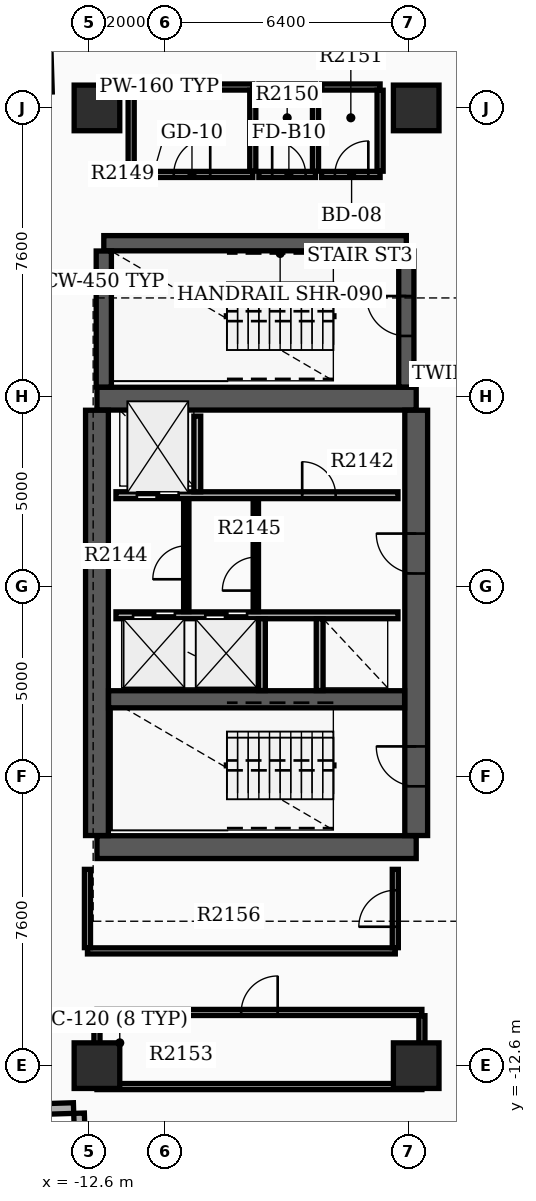
"""IFC4 building model, lengths in metres.
Left out: names, types, materials, properties, quantities, classifications, styles, units other than length and angle.
Written with IfcOpenShell. Run it as: python <this file> out.ifc"""

import sys

from ifc_helpers import new_model, si_unit, direction, frame, frame_2d, origin, origin_2d, place, context, subcontext, project, spatial, rectangle, extrude, element, fill, save


model = new_model("IFC4")
c1 = context("Model", 3, precision=1e-05, world=origin(), true_north=direction((0.0, 1.0)))
c2 = subcontext(c1, "Body", "Model", "MODEL_VIEW")
j1 = project(units=[si_unit("LENGTHUNIT", "METRE"), si_unit("PLANEANGLEUNIT", "RADIAN")], contexts=[c1])
p1 = place(None, origin())
s1 = spatial("IfcSite", under=j1, at=p1, CompositionType="ELEMENT")
p2 = place(p1, origin())
s2 = spatial("IfcBuilding", under=s1, at=p2, CompositionType="ELEMENT")
p3 = place(p2, frame((0.0, 0.0, 135.9)))
s3 = spatial("IfcBuildingStorey", under=s2, at=p3, CompositionType="ELEMENT", Elevation=135.9)
for number, where, z_axis, x_axis in (
    (1, (-12.4, -6.85, 0.0), (0.0, 0.0, 1.0), (1.0, 0.0, 0.0)),
    (2, (-12.4, 4.95, 0.0), (0.0, 0.0, 1.0), (1.0, 0.0, 0.0)),
):
    element("IfcWall", number, at=place(p3, frame(where, z_axis=z_axis, x_axis=x_axis)), inside=s3, PredefinedType="SHEAR", context=c2, shape_type="SweptSolid", body=[
        extrude(rectangle(XDim=8.4, YDim=0.6, at=frame_2d((4.2, 0.0))), origin(), (0.0, 0.0, 1.0), 3.7),
    ])
p4 = place(p3, frame((-12.4, -6.545, 0.0), z_axis=(0.0, 0.0, 1.0), x_axis=(0.0, 1.0, 0.0)))
e3 = element("IfcWall", 3, at=p4, inside=s3, PredefinedType="SHEAR", context=c2, shape_type="SweptSolid", body=[
    extrude(rectangle(XDim=11.19, YDim=0.6, at=frame_2d((5.595, 0.0))), origin(), (0.0, 0.0, 1.0), 3.7),
])
p5 = place(p3, frame((-4.0, -6.545, 0.0), z_axis=(0.0, 0.0, 1.0), x_axis=(0.0, 1.0, 0.0)))
e4 = element("IfcWall", 4, at=p5, inside=s3, PredefinedType="SHEAR", context=c2, shape_type="SweptSolid", body=[
    extrude(rectangle(XDim=11.19, YDim=0.6, at=frame_2d((5.595, 0.0))), origin(), (0.0, 0.0, 1.0), 3.7),
])
p6 = place(p5, frame((1.295, 0.0, 0.0)))
e5 = element("IfcOpeningElement", 5, at=p6, cuts=e4, PredefinedType="OPENING", context=c2, shape_type="SweptSolid", body=[
    extrude(rectangle(XDim=1.05, YDim=2.15, at=frame_2d((0.525, 1.075))), frame((0.0, 0.31, 0.0), z_axis=(0.0, -1.0, 0.0), x_axis=(1.0, 0.0, 0.0)), (0.0, 0.0, 1.0), 0.62),
])
p7 = place(p5, frame((6.895, 0.0, 0.0)))
e6 = element("IfcOpeningElement", 6, at=p7, cuts=e4, PredefinedType="OPENING", context=c2, shape_type="SweptSolid", body=[
    extrude(rectangle(XDim=1.05, YDim=2.15, at=frame_2d((0.525, 1.075))), frame((0.0, 0.31, 0.0), z_axis=(0.0, -1.0, 0.0), x_axis=(1.0, 0.0, 0.0)), (0.0, 0.0, 1.0), 0.62),
])
p8 = place(p3, frame((-12.095, -2.96, 0.0), z_axis=(0.0, 0.0, 1.0), x_axis=(1.0, 0.0, 0.0)))
e7 = element("IfcWall", 7, at=p8, inside=s3, PredefinedType="SHEAR", context=c2, shape_type="SweptSolid", body=[
    extrude(rectangle(XDim=7.79, YDim=0.45, at=frame_2d((3.895, 0.0))), origin(), (0.0, 0.0, 1.0), 3.7),
])
p9 = place(p3, frame((-12.22, 9.04, 0.0), z_axis=(0.0, 0.0, 1.0), x_axis=(1.0, 0.0, 0.0)))
e8 = element("IfcWall", 8, at=p9, inside=s3, PredefinedType="SHEAR", context=c2, shape_type="SweptSolid", body=[
    extrude(rectangle(XDim=7.96, YDim=0.4, at=frame_2d((3.98, 0.0))), origin(), (0.0, 0.0, 1.0), 3.7),
])
p10 = place(p3, frame((-12.22, 5.255, 0.0), z_axis=(0.0, 0.0, 1.0), x_axis=(0.0, 1.0, 0.0)))
e9 = element("IfcWall", 9, at=p10, inside=s3, PredefinedType="SHEAR", context=c2, shape_type="SweptSolid", body=[
    extrude(rectangle(XDim=3.58, YDim=0.4, at=frame_2d((1.79, 0.0))), origin(), (0.0, 0.0, 1.0), 3.7),
])
p11 = place(p3, frame((-4.26, 5.255, 0.0), z_axis=(0.0, 0.0, 1.0), x_axis=(0.0, 1.0, 0.0)))
e10 = element("IfcWall", 10, at=p11, inside=s3, PredefinedType="SHEAR", context=c2, shape_type="SweptSolid", body=[
    extrude(rectangle(XDim=3.58, YDim=0.4, at=frame_2d((1.79, 0.0))), origin(), (0.0, 0.0, 1.0), 3.7),
])
p12 = place(p11, frame((1.345, 0.0, 0.0)))
e11 = element("IfcOpeningElement", 11, at=p12, cuts=e10, PredefinedType="OPENING", context=c2, shape_type="SweptSolid", body=[
    extrude(rectangle(XDim=1.05, YDim=2.15, at=frame_2d((0.525, 1.075))), frame((0.0, 0.21, 0.0), z_axis=(0.0, -1.0, 0.0), x_axis=(1.0, 0.0, 0.0)), (0.0, 0.0, 1.0), 0.42),
])
for number, where, z_axis, x_axis in (
    (12, (-12.4, -12.6, 0.0), (0.0, 0.0, 1.0), (1.0, 0.0, 0.0)),
    (13, (-12.4, 12.6, 0.0), (0.0, 0.0, 1.0), (1.0, 0.0, 0.0)),
    (14, (-4.0, -12.6, 0.0), (0.0, 0.0, 1.0), (1.0, 0.0, 0.0)),
    (15, (-4.0, 12.6, 0.0), (0.0, 0.0, 1.0), (1.0, 0.0, 0.0)),
):
    element("IfcColumn", number, at=place(p3, frame(where, z_axis=z_axis, x_axis=x_axis)), inside=s3, PredefinedType="COLUMN", context=c2, shape_type="SweptSolid", body=[
        extrude(rectangle(XDim=1.2, YDim=1.2, at=origin_2d()), origin(), (0.0, 0.0, 1.0), 3.9),
    ])
p13 = place(p3, frame((-14.235, -13.754, 0.0), z_axis=(0.0, 0.0, 1.0), x_axis=(0.999506398264, 0.031415916822, 0.0)))
e16 = element("IfcWall", 16, at=p13, inside=s3, PredefinedType="STANDARD", context=c2, shape_type="SweptSolid", body=[
    extrude(rectangle(XDim=1.22, YDim=0.28, at=frame_2d((0.61, 0.0))), origin(), (0.0, 0.0, 1.0), 2.97),
])
p14 = place(p3, frame((-12.871, -13.851, 0.0), z_axis=(0.0, 0.0, 1.0), x_axis=(0.031412596484, -0.999506502621, 0.0)))
e17 = element("IfcWall", 17, at=p14, inside=s3, PredefinedType="STANDARD", context=c2, shape_type="SweptSolid", body=[
    extrude(rectangle(XDim=1.5, YDim=0.28, at=frame_2d((0.75, 0.0))), origin(), (0.0, 0.0, 1.0), 2.97),
])
p15 = place(p3, frame((-11.9, 2.41, 0.0), z_axis=(0.0, 0.0, 1.0), x_axis=(1.0, 0.0, 0.0)))
e18 = element("IfcWall", 18, at=p15, inside=s3, PredefinedType="SOLIDWALL", context=c2, shape_type="SweptSolid", body=[
    extrude(rectangle(XDim=7.42, YDim=0.18, at=frame_2d((3.71, 0.0))), origin(), (0.0, 0.0, 1.0), 2.96),
])
p16 = place(p15, frame((0.55, 0.0, 0.0)))
e19 = element("IfcOpeningElement", 19, at=p16, cuts=e18, PredefinedType="OPENING", context=c2, shape_type="SweptSolid", body=[
    extrude(rectangle(XDim=1.1, YDim=2.15, at=frame_2d((0.55, 1.075))), frame((0.0, 0.1, 0.0), z_axis=(0.0, -1.0, 0.0), x_axis=(1.0, 0.0, 0.0)), (0.0, 0.0, 1.0), 0.2),
])
p17 = place(p15, frame((4.9, 0.0, 0.0)))
e20 = element("IfcOpeningElement", 20, at=p17, cuts=e18, PredefinedType="OPENING", context=c2, shape_type="SweptSolid", body=[
    extrude(rectangle(XDim=0.88, YDim=2.1, at=frame_2d((0.44, 1.05))), frame((0.0, 0.1, 0.0), z_axis=(0.0, -1.0, 0.0), x_axis=(1.0, 0.0, 0.0)), (0.0, 0.0, 1.0), 0.2),
])
p18 = place(p3, frame((-11.9, -0.75, 0.0), z_axis=(0.0, 0.0, 1.0), x_axis=(1.0, 0.0, 0.0)))
e21 = element("IfcWall", 21, at=p18, inside=s3, PredefinedType="SOLIDWALL", context=c2, shape_type="SweptSolid", body=[
    extrude(rectangle(XDim=7.42, YDim=0.18, at=frame_2d((3.71, 0.0))), origin(), (0.0, 0.0, 1.0), 2.96),
])
p19 = place(p18, frame((0.45, 0.0, 0.0)))
e22 = element("IfcOpeningElement", 22, at=p19, cuts=e21, PredefinedType="OPENING", context=c2, shape_type="SweptSolid", body=[
    extrude(rectangle(XDim=1.1, YDim=2.15, at=frame_2d((0.55, 1.075))), frame((0.0, 0.1, 0.0), z_axis=(0.0, -1.0, 0.0), x_axis=(1.0, 0.0, 0.0)), (0.0, 0.0, 1.0), 0.2),
])
p20 = place(p18, frame((2.35, 0.0, 0.0)))
e23 = element("IfcOpeningElement", 23, at=p20, cuts=e21, PredefinedType="OPENING", context=c2, shape_type="SweptSolid", body=[
    extrude(rectangle(XDim=1.1, YDim=2.15, at=frame_2d((0.55, 1.075))), frame((0.0, 0.1, 0.0), z_axis=(0.0, -1.0, 0.0), x_axis=(1.0, 0.0, 0.0)), (0.0, 0.0, 1.0), 0.2),
])
p21 = place(p3, frame((-9.76, 2.5, 0.0), z_axis=(0.0, 0.0, 1.0), x_axis=(0.0, 1.0, 0.0)))
e24 = element("IfcWall", 24, at=p21, inside=s3, PredefinedType="SOLIDWALL", context=c2, shape_type="SweptSolid", body=[
    extrude(rectangle(XDim=1.99, YDim=0.18, at=frame_2d((0.995, 0.0))), origin(), (0.0, 0.0, 1.0), 2.96),
])
for number, where, z_axis, x_axis in (
    (25, (-8.06, -2.73, 0.0), (0.0, 0.0, 1.0), (0.0, 1.0, 0.0)),
    (26, (-6.54, -2.73, 0.0), (0.0, 0.0, 1.0), (0.0, 1.0, 0.0)),
):
    element("IfcWall", number, at=place(p3, frame(where, z_axis=z_axis, x_axis=x_axis)), inside=s3, PredefinedType="SOLIDWALL", context=c2, shape_type="SweptSolid", body=[
        extrude(rectangle(XDim=1.89, YDim=0.18, at=frame_2d((0.945, 0.0))), origin(), (0.0, 0.0, 1.0), 2.96),
    ])
p22 = place(p3, frame((-8.22, -0.65, 0.0), z_axis=(0.0, 0.0, 1.0), x_axis=(0.0, 1.0, 0.0)))
e27 = element("IfcWall", 27, at=p22, inside=s3, PredefinedType="SOLIDWALL", context=c2, shape_type="SweptSolid", body=[
    extrude(rectangle(XDim=2.96, YDim=0.14, at=frame_2d((1.48, 0.0))), origin(), (0.0, 0.0, 1.0), 2.96),
])
p23 = place(p22, frame((0.55, 0.0, 0.0)))
e28 = element("IfcOpeningElement", 28, at=p23, cuts=e27, PredefinedType="OPENING", context=c2, shape_type="SweptSolid", body=[
    extrude(rectangle(XDim=0.88, YDim=2.1, at=frame_2d((0.44, 1.05))), frame((0.0, 0.08, 0.0), z_axis=(0.0, -1.0, 0.0), x_axis=(1.0, 0.0, 0.0)), (0.0, 0.0, 1.0), 0.16),
])
p24 = place(p3, frame((-10.05, -0.652, 0.0), z_axis=(0.0, 0.0, 1.0), x_axis=(0.0, 1.0, 0.0)))
e29 = element("IfcWall", 29, at=p24, inside=s3, PredefinedType="PARTITIONING", context=c2, shape_type="SweptSolid", body=[
    extrude(rectangle(XDim=2.962, YDim=0.14, at=frame_2d((1.481, 0.0))), origin(), (0.0, 0.0, 1.0), 2.96),
])
p25 = place(p24, frame((0.85, 0.0, 0.0)))
e30 = element("IfcOpeningElement", 30, at=p25, cuts=e29, PredefinedType="OPENING", context=c2, shape_type="SweptSolid", body=[
    extrude(rectangle(XDim=0.88, YDim=2.1, at=frame_2d((0.44, 1.05))), frame((0.0, 0.08, 0.0), z_axis=(0.0, -1.0, 0.0), x_axis=(1.0, 0.0, 0.0)), (0.0, 0.0, 1.0), 0.16),
])
p26 = place(p3, frame((-11.5, 10.85, 0.0), z_axis=(0.0, 0.0, 1.0), x_axis=(1.0, 0.0, 0.0)))
e31 = element("IfcWall", 31, at=p26, inside=s3, PredefinedType="PARTITIONING", context=c2, shape_type="SweptSolid", body=[
    extrude(rectangle(XDim=3.2, YDim=0.16, at=frame_2d((1.6, 0.0))), origin(), (0.0, 0.0, 1.0), 2.96),
])
p27 = place(p26, frame((1.12, 0.0, 0.0)))
e32 = element("IfcOpeningElement", 32, at=p27, cuts=e31, PredefinedType="OPENING", context=c2, shape_type="SweptSolid", body=[
    extrude(rectangle(XDim=0.96, YDim=2.15, at=frame_2d((0.48, 1.075))), frame((0.0, 0.09, 0.0), z_axis=(0.0, -1.0, 0.0), x_axis=(1.0, 0.0, 0.0)), (0.0, 0.0, 1.0), 0.18),
])
p28 = place(p3, frame((-11.5, 13.15, 0.0), z_axis=(0.0, 0.0, 1.0), x_axis=(1.0, 0.0, 0.0)))
e33 = element("IfcWall", 33, at=p28, inside=s3, PredefinedType="PARTITIONING", context=c2, shape_type="SweptSolid", body=[
    extrude(rectangle(XDim=3.2, YDim=0.16, at=frame_2d((1.6, 0.0))), origin(), (0.0, 0.0, 1.0), 2.96),
])
for number, where, z_axis, x_axis in (
    (34, (-11.5, 10.935, 0.0), (0.0, 0.0, 1.0), (0.0, 1.0, 0.0)),
    (35, (-8.3, 10.935, 0.0), (0.0, 0.0, 1.0), (0.0, 1.0, 0.0)),
):
    element("IfcWall", number, at=place(p3, frame(where, z_axis=z_axis, x_axis=x_axis)), inside=s3, PredefinedType="PARTITIONING", context=c2, shape_type="SweptSolid", body=[
        extrude(rectangle(XDim=2.13, YDim=0.16, at=frame_2d((1.065, 0.0))), origin(), (0.0, 0.0, 1.0), 2.96),
    ])
p29 = place(p3, frame((-8.14, 10.85, 0.0), z_axis=(0.0, 0.0, 1.0), x_axis=(1.0, 0.0, 0.0)))
e36 = element("IfcWall", 36, at=p29, inside=s3, PredefinedType="PARTITIONING", context=c2, shape_type="SweptSolid", body=[
    extrude(rectangle(XDim=1.49, YDim=0.16, at=frame_2d((0.745, 0.0))), origin(), (0.0, 0.0, 1.0), 2.96),
])
p30 = place(p29, frame((0.35, 0.0, 0.0)))
e37 = element("IfcOpeningElement", 37, at=p30, cuts=e36, PredefinedType="OPENING", context=c2, shape_type="SweptSolid", body=[
    extrude(rectangle(XDim=0.88, YDim=2.1, at=frame_2d((0.44, 1.05))), frame((0.0, 0.09, 0.0), z_axis=(0.0, -1.0, 0.0), x_axis=(1.0, 0.0, 0.0)), (0.0, 0.0, 1.0), 0.18),
])
p31 = place(p3, frame((-8.14, 13.15, 0.0), z_axis=(0.0, 0.0, 1.0), x_axis=(1.0, 0.0, 0.0)))
e38 = element("IfcWall", 38, at=p31, inside=s3, PredefinedType="PARTITIONING", context=c2, shape_type="SweptSolid", body=[
    extrude(rectangle(XDim=1.49, YDim=0.16, at=frame_2d((0.745, 0.0))), origin(), (0.0, 0.0, 1.0), 2.96),
])
p32 = place(p3, frame((-6.65, 10.935, 0.0), z_axis=(0.0, 0.0, 1.0), x_axis=(0.0, 1.0, 0.0)))
e39 = element("IfcWall", 39, at=p32, inside=s3, PredefinedType="PARTITIONING", context=c2, shape_type="SweptSolid", body=[
    extrude(rectangle(XDim=2.13, YDim=0.16, at=frame_2d((1.065, 0.0))), origin(), (0.0, 0.0, 1.0), 2.96),
])
p33 = place(p3, frame((-6.49, 10.85, 0.0), z_axis=(0.0, 0.0, 1.0), x_axis=(1.0, 0.0, 0.0)))
e40 = element("IfcWall", 40, at=p33, inside=s3, PredefinedType="PARTITIONING", context=c2, shape_type="SweptSolid", body=[
    extrude(rectangle(XDim=1.54, YDim=0.16, at=frame_2d((0.77, 0.0))), origin(), (0.0, 0.0, 1.0), 2.96),
])
p34 = place(p33, frame((0.35, 0.0, 0.0)))
e41 = element("IfcOpeningElement", 41, at=p34, cuts=e40, PredefinedType="OPENING", context=c2, shape_type="SweptSolid", body=[
    extrude(rectangle(XDim=0.88, YDim=2.15, at=frame_2d((0.44, 1.075))), frame((0.0, 0.09, 0.0), z_axis=(0.0, -1.0, 0.0), x_axis=(1.0, 0.0, 0.0)), (0.0, 0.0, 1.0), 0.18),
])
p35 = place(p3, frame((-6.49, 13.15, 0.0), z_axis=(0.0, 0.0, 1.0), x_axis=(1.0, 0.0, 0.0)))
e42 = element("IfcWall", 42, at=p35, inside=s3, PredefinedType="PARTITIONING", context=c2, shape_type="SweptSolid", body=[
    extrude(rectangle(XDim=1.54, YDim=0.16, at=frame_2d((0.77, 0.0))), origin(), (0.0, 0.0, 1.0), 2.96),
])
p36 = place(p3, frame((-4.95, 10.935, 0.0), z_axis=(0.0, 0.0, 1.0), x_axis=(0.0, 1.0, 0.0)))
e43 = element("IfcWall", 43, at=p36, inside=s3, PredefinedType="PARTITIONING", context=c2, shape_type="SweptSolid", body=[
    extrude(rectangle(XDim=2.13, YDim=0.16, at=frame_2d((1.065, 0.0))), origin(), (0.0, 0.0, 1.0), 2.96),
])
p37 = place(p3, frame((-12.4, -13.15, 0.0), z_axis=(0.0, 0.0, 1.0), x_axis=(1.0, 0.0, 0.0)))
e44 = element("IfcWall", 44, at=p37, inside=s3, PredefinedType="PARTITIONING", context=c2, shape_type="SweptSolid", body=[
    extrude(rectangle(XDim=8.55, YDim=0.16, at=frame_2d((4.275, 0.0))), origin(), (0.0, 0.0, 1.0), 2.96),
])
p38 = place(p3, frame((-12.4, -11.2, 0.0), z_axis=(0.0, 0.0, 1.0), x_axis=(1.0, 0.0, 0.0)))
e45 = element("IfcWall", 45, at=p38, inside=s3, PredefinedType="PARTITIONING", context=c2, shape_type="SweptSolid", body=[
    extrude(rectangle(XDim=8.55, YDim=0.16, at=frame_2d((4.275, 0.0))), origin(), (0.0, 0.0, 1.0), 2.96),
])
p39 = place(p38, frame((3.795, 0.0, 0.0)))
e46 = element("IfcOpeningElement", 46, at=p39, cuts=e45, PredefinedType="OPENING", context=c2, shape_type="SweptSolid", body=[
    extrude(rectangle(XDim=0.96, YDim=2.15, at=frame_2d((0.48, 1.075))), frame((0.0, 0.09, 0.0), z_axis=(0.0, -1.0, 0.0), x_axis=(1.0, 0.0, 0.0)), (0.0, 0.0, 1.0), 0.18),
])
for number, where, z_axis, x_axis in (
    (47, (-12.4, -13.065, 0.0), (0.0, 0.0, 1.0), (0.0, 1.0, 0.0)),
    (48, (-3.85, -13.065, 0.0), (0.0, 0.0, 1.0), (0.0, 1.0, 0.0)),
):
    element("IfcWall", number, at=place(p3, frame(where, z_axis=z_axis, x_axis=x_axis)), inside=s3, PredefinedType="PARTITIONING", context=c2, shape_type="SweptSolid", body=[
        extrude(rectangle(XDim=1.78, YDim=0.16, at=frame_2d((0.89, 0.0))), origin(), (0.0, 0.0, 1.0), 2.96),
    ])
p40 = place(p3, frame((-12.65, -9.58, 0.0), z_axis=(0.0, 0.0, 1.0), x_axis=(1.0, 0.0, 0.0)))
e49 = element("IfcWall", 49, at=p40, inside=s3, PredefinedType="PARTITIONING", context=c2, shape_type="SweptSolid", body=[
    extrude(rectangle(XDim=8.1, YDim=0.16, at=frame_2d((4.05, 0.0))), origin(), (0.0, 0.0, 1.0), 2.96),
])
p41 = place(p3, frame((-12.65, -9.495, 0.0), z_axis=(0.0, 0.0, 1.0), x_axis=(0.0, 1.0, 0.0)))
e50 = element("IfcWall", 50, at=p41, inside=s3, PredefinedType="PARTITIONING", context=c2, shape_type="SweptSolid", body=[
    extrude(rectangle(XDim=2.06, YDim=0.16, at=frame_2d((1.03, 0.0))), origin(), (0.0, 0.0, 1.0), 2.96),
])
p42 = place(p3, frame((-4.55, -9.495, 0.0), z_axis=(0.0, 0.0, 1.0), x_axis=(0.0, 1.0, 0.0)))
e51 = element("IfcWall", 51, at=p42, inside=s3, PredefinedType="PARTITIONING", context=c2, shape_type="SweptSolid", body=[
    extrude(rectangle(XDim=2.06, YDim=0.16, at=frame_2d((1.03, 0.0))), origin(), (0.0, 0.0, 1.0), 2.96),
])
p43 = place(p42, frame((0.55, 0.0, 0.0)))
e52 = element("IfcOpeningElement", 52, at=p43, cuts=e51, PredefinedType="OPENING", context=c2, shape_type="SweptSolid", body=[
    extrude(rectangle(XDim=0.96, YDim=2.15, at=frame_2d((0.48, 1.075))), frame((0.0, 0.09, 0.0), z_axis=(0.0, -1.0, 0.0), x_axis=(1.0, 0.0, 0.0)), (0.0, 0.0, 1.0), 0.18),
])
p44 = place(p6, origin())
e53 = element("IfcDoor", 53, at=p44, inside=s3, OperationType="SINGLE_SWING_RIGHT", PredefinedType="DOOR", context=c2, shape_type="SweptSolid", body=[
    extrude(rectangle(XDim=1.05, YDim=2.15, at=frame_2d((0.525, 1.075))), frame((0.0, 0.025, 0.0), z_axis=(0.0, -1.0, 0.0), x_axis=(1.0, 0.0, 0.0)), (0.0, 0.0, 1.0), 0.05),
])
fill(e5, e53)
p45 = place(p7, origin())
e54 = element("IfcDoor", 54, at=p45, inside=s3, OperationType="SINGLE_SWING_RIGHT", PredefinedType="DOOR", context=c2, shape_type="SweptSolid", body=[
    extrude(rectangle(XDim=1.05, YDim=2.15, at=frame_2d((0.525, 1.075))), frame((0.0, 0.025, 0.0), z_axis=(0.0, -1.0, 0.0), x_axis=(1.0, 0.0, 0.0)), (0.0, 0.0, 1.0), 0.05),
])
fill(e6, e54)
p46 = place(p12, origin())
e55 = element("IfcDoor", 55, at=p46, inside=s3, OperationType="SINGLE_SWING_RIGHT", PredefinedType="DOOR", context=c2, shape_type="SweptSolid", body=[
    extrude(rectangle(XDim=1.05, YDim=2.15, at=frame_2d((0.525, 1.075))), frame((0.0, 0.025, 0.0), z_axis=(0.0, -1.0, 0.0), x_axis=(1.0, 0.0, 0.0)), (0.0, 0.0, 1.0), 0.05),
])
fill(e11, e55)
p47 = place(p16, origin())
e56 = element("IfcDoor", 56, at=p47, inside=s3, OperationType="DOUBLE_DOOR_SLIDING", PredefinedType="DOOR", context=c2, shape_type="SweptSolid", body=[
    extrude(rectangle(XDim=1.1, YDim=2.15, at=frame_2d((0.55, 1.075))), frame((0.0, 0.025, 0.0), z_axis=(0.0, -1.0, 0.0), x_axis=(1.0, 0.0, 0.0)), (0.0, 0.0, 1.0), 0.05),
])
fill(e19, e56)
p48 = place(p19, origin())
e57 = element("IfcDoor", 57, at=p48, inside=s3, OperationType="DOUBLE_DOOR_SLIDING", PredefinedType="DOOR", context=c2, shape_type="SweptSolid", body=[
    extrude(rectangle(XDim=1.1, YDim=2.15, at=frame_2d((0.55, 1.075))), frame((0.0, 0.025, 0.0), z_axis=(0.0, -1.0, 0.0), x_axis=(1.0, 0.0, 0.0)), (0.0, 0.0, 1.0), 0.05),
])
fill(e22, e57)
p49 = place(p20, origin())
e58 = element("IfcDoor", 58, at=p49, inside=s3, OperationType="DOUBLE_DOOR_SLIDING", PredefinedType="DOOR", context=c2, shape_type="SweptSolid", body=[
    extrude(rectangle(XDim=1.1, YDim=2.15, at=frame_2d((0.55, 1.075))), frame((0.0, 0.025, 0.0), z_axis=(0.0, -1.0, 0.0), x_axis=(1.0, 0.0, 0.0)), (0.0, 0.0, 1.0), 0.05),
])
fill(e23, e58)
p50 = place(p17, origin())
e59 = element("IfcDoor", 59, at=p50, inside=s3, OperationType="SINGLE_SWING_LEFT", PredefinedType="DOOR", context=c2, shape_type="SweptSolid", body=[
    extrude(rectangle(XDim=0.88, YDim=2.1, at=frame_2d((0.44, 1.05))), frame((0.0, 0.025, 0.0), z_axis=(0.0, -1.0, 0.0), x_axis=(1.0, 0.0, 0.0)), (0.0, 0.0, 1.0), 0.05),
])
fill(e20, e59)
p51 = place(p23, origin())
e60 = element("IfcDoor", 60, at=p51, inside=s3, OperationType="SINGLE_SWING_LEFT", PredefinedType="DOOR", context=c2, shape_type="SweptSolid", body=[
    extrude(rectangle(XDim=0.88, YDim=2.1, at=frame_2d((0.44, 1.05))), frame((0.0, 0.025, 0.0), z_axis=(0.0, -1.0, 0.0), x_axis=(1.0, 0.0, 0.0)), (0.0, 0.0, 1.0), 0.05),
])
fill(e28, e60)
p52 = place(p25, origin())
e61 = element("IfcDoor", 61, at=p52, inside=s3, OperationType="SINGLE_SWING_LEFT", PredefinedType="DOOR", context=c2, shape_type="SweptSolid", body=[
    extrude(rectangle(XDim=0.88, YDim=2.1, at=frame_2d((0.44, 1.05))), frame((0.0, 0.025, 0.0), z_axis=(0.0, -1.0, 0.0), x_axis=(1.0, 0.0, 0.0)), (0.0, 0.0, 1.0), 0.05),
])
fill(e30, e61)
p53 = place(p27, origin())
e62 = element("IfcDoor", 62, at=p53, inside=s3, OperationType="SINGLE_SWING_RIGHT", PredefinedType="DOOR", context=c2, shape_type="SweptSolid", body=[
    extrude(rectangle(XDim=0.96, YDim=2.15, at=frame_2d((0.48, 1.075))), frame((0.0, 0.025, 0.0), z_axis=(0.0, -1.0, 0.0), x_axis=(1.0, 0.0, 0.0)), (0.0, 0.0, 1.0), 0.05),
])
fill(e32, e62)
p54 = place(p30, origin())
e63 = element("IfcDoor", 63, at=p54, inside=s3, OperationType="SINGLE_SWING_LEFT", PredefinedType="DOOR", context=c2, shape_type="SweptSolid", body=[
    extrude(rectangle(XDim=0.88, YDim=2.1, at=frame_2d((0.44, 1.05))), frame((0.0, 0.025, 0.0), z_axis=(0.0, -1.0, 0.0), x_axis=(1.0, 0.0, 0.0)), (0.0, 0.0, 1.0), 0.05),
])
fill(e37, e63)
p55 = place(p34, origin())
e64 = element("IfcDoor", 64, at=p55, inside=s3, OperationType="SINGLE_SWING_RIGHT", PredefinedType="DOOR", context=c2, shape_type="SweptSolid", body=[
    extrude(rectangle(XDim=0.88, YDim=2.15, at=frame_2d((0.44, 1.075))), frame((0.0, 0.025, 0.0), z_axis=(0.0, -1.0, 0.0), x_axis=(1.0, 0.0, 0.0)), (0.0, 0.0, 1.0), 0.05),
])
fill(e41, e64)
p56 = place(p39, origin())
e65 = element("IfcDoor", 65, at=p56, inside=s3, OperationType="SINGLE_SWING_RIGHT", PredefinedType="DOOR", context=c2, shape_type="SweptSolid", body=[
    extrude(rectangle(XDim=0.96, YDim=2.15, at=frame_2d((0.48, 1.075))), frame((0.0, 0.025, 0.0), z_axis=(0.0, -1.0, 0.0), x_axis=(1.0, 0.0, 0.0)), (0.0, 0.0, 1.0), 0.05),
])
fill(e46, e65)
p57 = place(p43, origin())
e66 = element("IfcDoor", 66, at=p57, inside=s3, OperationType="SINGLE_SWING_LEFT", PredefinedType="DOOR", context=c2, shape_type="SweptSolid", body=[
    extrude(rectangle(XDim=0.96, YDim=2.15, at=frame_2d((0.48, 1.075))), frame((0.0, 0.025, 0.0), z_axis=(0.0, -1.0, 0.0), x_axis=(1.0, 0.0, 0.0)), (0.0, 0.0, 1.0), 0.05),
])
fill(e52, e66)
save(model, sys.argv[1])
